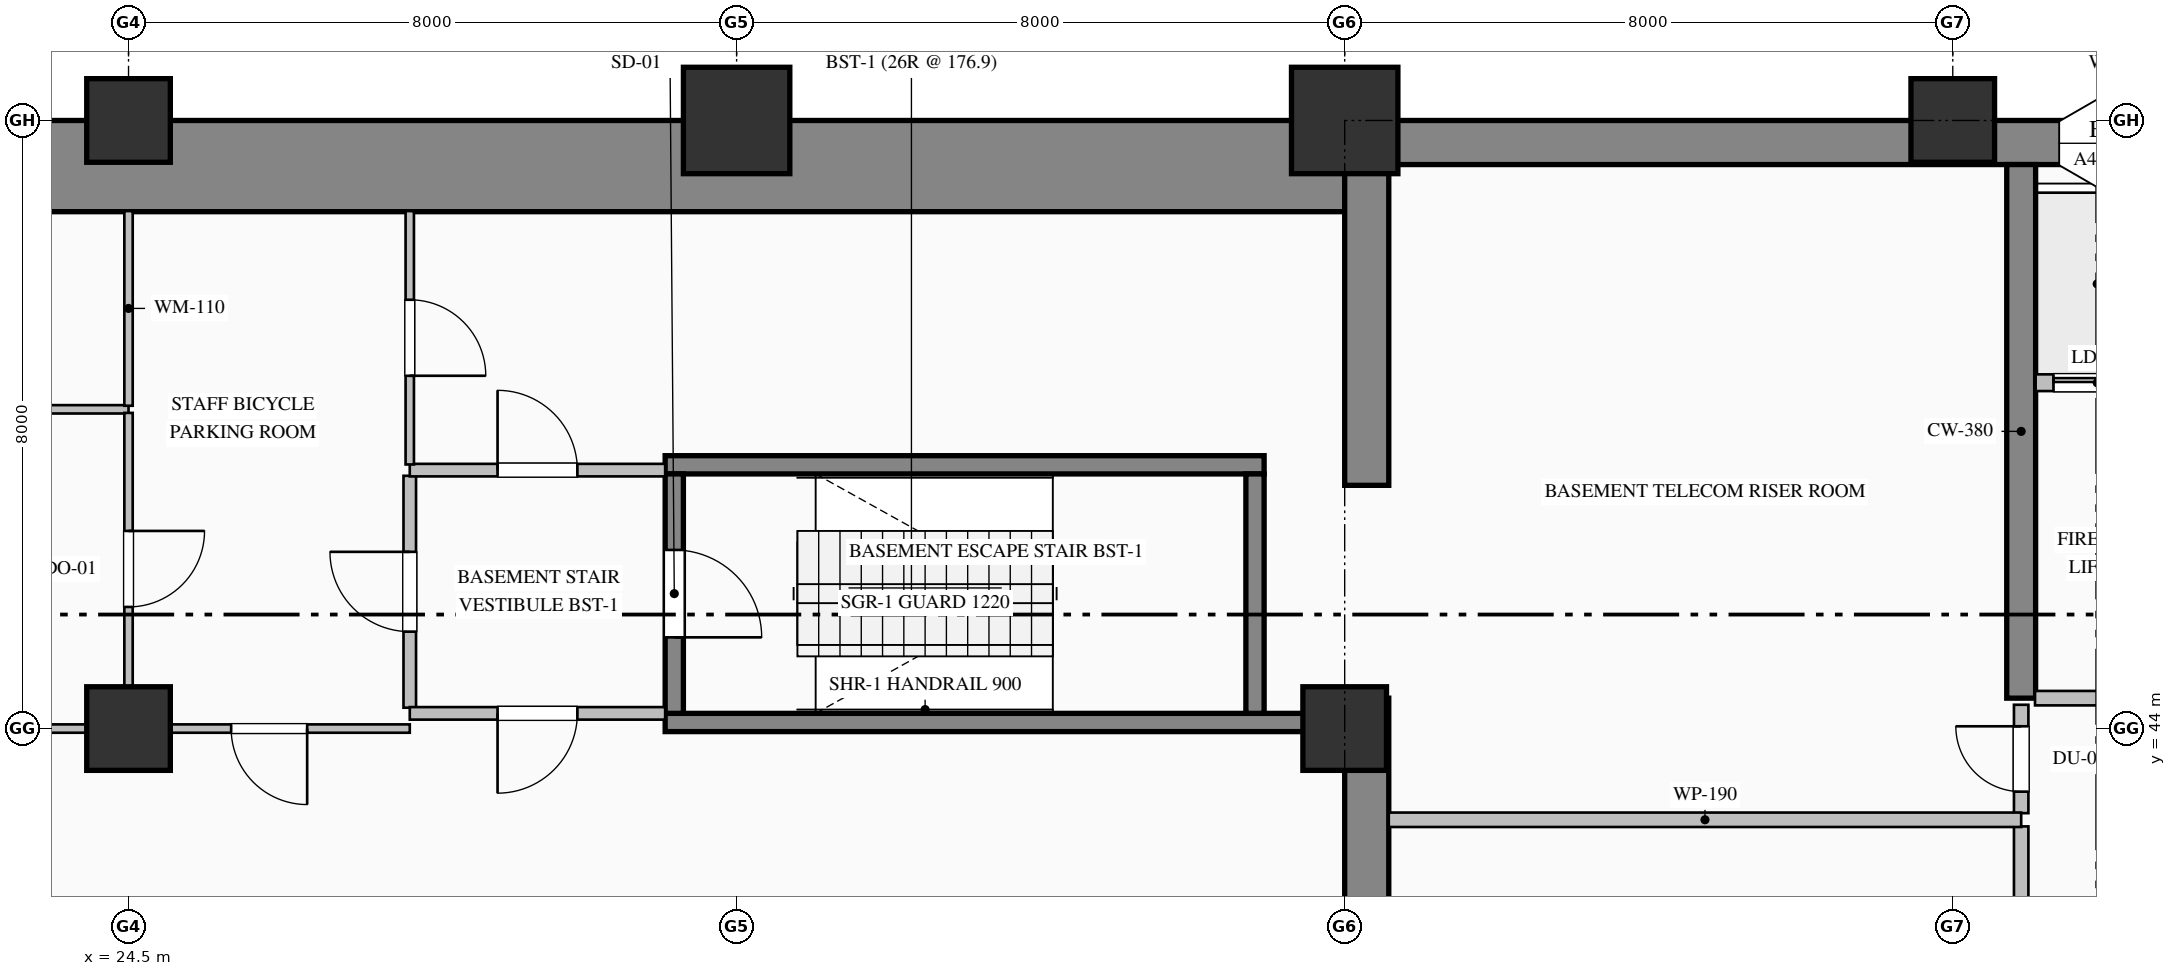
"""IFC4 building model, lengths in metres.
Left out: names, types, materials, properties, quantities, classifications, styles, units other than length and angle.
Written with IfcOpenShell. Run it as: python <this file> out.ifc"""

import sys

from ifc_helpers import new_model, si_unit, direction, frame, frame_2d, origin, origin_2d, place, context, subcontext, project, spatial, rectangle, hollow_rectangle, extrude, element, fill, save


model = new_model("IFC4")
c1 = context("Model", 3, precision=1e-05, world=origin(), true_north=direction((0.0, 1.0)))
c2 = subcontext(c1, "Body", "Model", "MODEL_VIEW")
j1 = project(units=[si_unit("LENGTHUNIT", "METRE"), si_unit("PLANEANGLEUNIT", "RADIAN")], contexts=[c1])
p1 = place(None, origin())
s1 = spatial("IfcSite", under=j1, at=p1, CompositionType="ELEMENT")
p2 = place(p1, origin())
s2 = spatial("IfcBuilding", under=s1, at=p2, CompositionType="ELEMENT")
p3 = place(p2, frame((0.0, 0.0, -4.6)))
s3 = spatial("IfcBuildingStorey", under=s2, at=p3, CompositionType="ELEMENT", Elevation=-4.6)
p4 = place(p3, frame((-1.2, 51.4, 0.0), z_axis=(0.0, 0.0, 1.0), x_axis=(1.0, 0.0, 0.0)))
e1 = element("IfcWall", 1, at=p4, inside=s3, PredefinedType="USERDEFINED", context=c2, shape_type="SweptSolid", body=[
    extrude(rectangle(XDim=41.7, YDim=1.2, at=frame_2d((20.85, 0.0))), origin(), (0.0, 0.0, 1.0), 4.45),
])
p5 = place(p3, frame((40.5, 51.71, 0.0), z_axis=(0.0, 0.0, 1.0), x_axis=(1.0, 0.0, 0.0)))
e2 = element("IfcWall", 2, at=p5, inside=s3, PredefinedType="SHEAR", context=c2, shape_type="SweptSolid", body=[
    extrude(rectangle(XDim=23.5, YDim=0.58, at=frame_2d((11.75, 0.0))), origin(), (0.0, 0.0, 1.0), 4.18),
])
p6 = place(p3, frame((40.79, 36.58, 0.0), z_axis=(0.0, 0.0, 1.0), x_axis=(0.0, 1.0, 0.0)))
e3 = element("IfcWall", 3, at=p6, inside=s3, PredefinedType="SHEAR", context=c2, shape_type="SweptSolid", body=[
    extrude(rectangle(XDim=7.82, YDim=0.58, at=frame_2d((3.91, 0.0))), origin(), (0.0, 0.0, 1.0), 4.18),
])
p7 = place(p3, frame((40.79, 47.2, 0.0), z_axis=(0.0, 0.0, 1.0), x_axis=(0.0, 1.0, 0.0)))
e4 = element("IfcWall", 4, at=p7, inside=s3, PredefinedType="SHEAR", context=c2, shape_type="SweptSolid", body=[
    extrude(rectangle(XDim=4.22, YDim=0.58, at=frame_2d((2.11, 0.0))), origin(), (0.0, 0.0, 1.0), 4.18),
])
p8 = place(p3, frame((49.4, 44.4, 0.0), z_axis=(0.0, 0.0, 1.0), x_axis=(0.0, 1.0, 0.0)))
e5 = element("IfcWall", 5, at=p8, inside=s3, PredefinedType="SHEAR", context=c2, shape_type="SweptSolid", body=[
    extrude(rectangle(XDim=7.02, YDim=0.38, at=frame_2d((3.51, 0.0))), origin(), (0.0, 0.0, 1.0), 4.18),
])
p9 = place(p3, frame((24.5, 44.0, 0.0), z_axis=(0.0, 0.0, 1.0), x_axis=(1.0, 0.0, 0.0)))
e6 = element("IfcColumn", 6, at=p9, inside=s3, PredefinedType="COLUMN", context=c2, shape_type="SweptSolid", body=[
    extrude(rectangle(XDim=1.1, YDim=1.1, at=origin_2d()), origin(), (0.0, 0.0, 1.0), 4.6),
])
p10 = place(p3, frame((24.5, 52.0, 0.0), z_axis=(0.0, 0.0, 1.0), x_axis=(1.0, 0.0, 0.0)))
e7 = element("IfcColumn", 7, at=p10, inside=s3, PredefinedType="COLUMN", context=c2, shape_type="SweptSolid", body=[
    extrude(hollow_rectangle(XDim=1.1, YDim=1.1, WallThickness=0.04, at=origin_2d()), origin(), (0.0, 0.0, 1.0), 4.6),
])
p11 = place(p3, frame((32.5, 52.0, 0.0), z_axis=(0.0, 0.0, 1.0), x_axis=(1.0, 0.0, 0.0)))
e8 = element("IfcColumn", 8, at=p11, inside=s3, PredefinedType="COLUMN", context=c2, shape_type="SweptSolid", body=[
    extrude(hollow_rectangle(XDim=1.4, YDim=1.4, WallThickness=0.05, at=origin_2d()), origin(), (0.0, 0.0, 1.0), 4.6),
])
p12 = place(p3, frame((40.5, 44.0, 0.0), z_axis=(0.0, 0.0, 1.0), x_axis=(1.0, 0.0, 0.0)))
e9 = element("IfcColumn", 9, at=p12, inside=s3, PredefinedType="COLUMN", context=c2, shape_type="SweptSolid", body=[
    extrude(rectangle(XDim=1.1, YDim=1.1, at=origin_2d()), origin(), (0.0, 0.0, 1.0), 4.6),
])
p13 = place(p3, frame((40.5, 52.0, 0.0), z_axis=(0.0, 0.0, 1.0), x_axis=(1.0, 0.0, 0.0)))
e10 = element("IfcColumn", 10, at=p13, inside=s3, PredefinedType="COLUMN", context=c2, shape_type="SweptSolid", body=[
    extrude(hollow_rectangle(XDim=1.4, YDim=1.4, WallThickness=0.05, at=origin_2d()), origin(), (0.0, 0.0, 1.0), 4.6),
])
p14 = place(p3, frame((48.5, 52.0, 0.0), z_axis=(0.0, 0.0, 1.0), x_axis=(1.0, 0.0, 0.0)))
e11 = element("IfcColumn", 11, at=p14, inside=s3, PredefinedType="COLUMN", context=c2, shape_type="SweptSolid", body=[
    extrude(hollow_rectangle(XDim=1.1, YDim=1.1, WallThickness=0.04, at=origin_2d()), origin(), (0.0, 0.0, 1.0), 4.6),
])
p15 = place(p3, frame((31.56, 47.47, 0.0), z_axis=(0.0, 0.0, 1.0), x_axis=(1.0, 0.0, 0.0)))
e12 = element("IfcWall", 12, at=p15, inside=s3, PredefinedType="SOLIDWALL", context=c2, shape_type="SweptSolid", body=[
    extrude(rectangle(XDim=7.88, YDim=0.24, at=frame_2d((3.94, 0.0))), origin(), (0.0, 0.0, 1.0), 4.6),
])
p16 = place(p3, frame((39.97, 44.08, 0.0), z_axis=(0.0, 0.0, 1.0), x_axis=(-1.0, 0.0, 0.0)))
e13 = element("IfcWall", 13, at=p16, inside=s3, PredefinedType="SOLIDWALL", context=c2, shape_type="SweptSolid", body=[
    extrude(rectangle(XDim=8.41, YDim=0.24, at=frame_2d((4.205, 0.0))), origin(), (0.0, 0.0, 1.0), 4.6),
])
p17 = place(p3, frame((31.68, 47.35, 0.0), z_axis=(0.0, 0.0, 1.0), x_axis=(0.0, -1.0, 0.0)))
e14 = element("IfcWall", 14, at=p17, inside=s3, PredefinedType="SOLIDWALL", context=c2, shape_type="SweptSolid", body=[
    extrude(rectangle(XDim=3.15, YDim=0.24, at=frame_2d((1.575, 0.0))), origin(), (0.0, 0.0, 1.0), 4.6),
])
p18 = place(p17, frame((1.0, 0.0, 0.0)))
e15 = element("IfcOpeningElement", 15, at=p18, cuts=e14, PredefinedType="OPENING", context=c2, shape_type="SweptSolid", body=[
    extrude(rectangle(XDim=1.15, YDim=2.2, at=frame_2d((0.575, 1.1))), frame((0.0, 0.13, 0.0), z_axis=(0.0, -1.0, 0.0), x_axis=(1.0, 0.0, 0.0)), (0.0, 0.0, 1.0), 0.26),
])
p19 = place(p3, frame((39.32, 44.2, 0.0), z_axis=(0.0, 0.0, 1.0), x_axis=(0.0, 1.0, 0.0)))
e16 = element("IfcWall", 16, at=p19, inside=s3, PredefinedType="SOLIDWALL", context=c2, shape_type="SweptSolid", body=[
    extrude(rectangle(XDim=3.15, YDim=0.24, at=frame_2d((1.575, 0.0))), origin(), (0.0, 0.0, 1.0), 4.6),
])
p20 = place(p3, frame((54.71, 48.55, 0.0), z_axis=(0.0, 0.0, 1.0), x_axis=(-1.0, 0.0, 0.0)))
e17 = element("IfcWall", 17, at=p20, inside=s3, PredefinedType="PARTITIONING", context=c2, shape_type="SweptSolid", body=[
    extrude(rectangle(XDim=5.12, YDim=0.22, at=frame_2d((2.56, 0.0))), origin(), (0.0, 0.0, 1.0), 4.18),
])
p21 = place(p20, frame((3.735, 0.0, 0.0)))
e18 = element("IfcOpeningElement", 18, at=p21, cuts=e17, PredefinedType="OPENING", context=c2, shape_type="SweptSolid", body=[
    extrude(rectangle(XDim=1.15, YDim=2.2, at=frame_2d((0.575, 1.1))), frame((0.0, 0.12, 0.0), z_axis=(0.0, -1.0, 0.0), x_axis=(1.0, 0.0, 0.0)), (0.0, 0.0, 1.0), 0.24),
])
p22 = place(p20, frame((0.935, 0.0, 0.0)))
e19 = element("IfcOpeningElement", 19, at=p22, cuts=e17, PredefinedType="OPENING", context=c2, shape_type="SweptSolid", body=[
    extrude(rectangle(XDim=1.15, YDim=2.2, at=frame_2d((0.575, 1.1))), frame((0.0, 0.12, 0.0), z_axis=(0.0, -1.0, 0.0), x_axis=(1.0, 0.0, 0.0)), (0.0, 0.0, 1.0), 0.24),
])
p23 = place(p3, frame((54.718, 44.4, 0.0), z_axis=(0.0, 0.0, 1.0), x_axis=(-1.0, 0.0, 0.0)))
e20 = element("IfcWall", 20, at=p23, inside=s3, PredefinedType="PARTITIONING", context=c2, shape_type="SweptSolid", body=[
    extrude(rectangle(XDim=5.136, YDim=0.19, at=frame_2d((2.568, 0.0))), origin(), (0.0, 0.0, 1.0), 4.18),
])
p24 = place(p23, frame((2.043, 0.0, 0.0)))
e21 = element("IfcOpeningElement", 21, at=p24, cuts=e20, PredefinedType="OPENING", context=c2, shape_type="SweptSolid", body=[
    extrude(rectangle(XDim=1.05, YDim=2.15, at=frame_2d((0.525, 1.075))), frame((0.0, 0.105, 0.0), z_axis=(0.0, -1.0, 0.0), x_axis=(1.0, 0.0, 0.0)), (0.0, 0.0, 1.0), 0.21),
])
p25 = place(p3, frame((49.4, 36.58, 0.0), z_axis=(0.0, 0.0, 1.0), x_axis=(0.0, 1.0, 0.0)))
e22 = element("IfcWall", 22, at=p25, inside=s3, PredefinedType="PARTITIONING", context=c2, shape_type="SweptSolid", body=[
    extrude(rectangle(XDim=6.133, YDim=0.19, at=frame_2d((3.066, 0.0))), origin(), (0.0, 0.0, 1.0), 3.272),
])
p26 = place(p25, frame((2.366, 0.0, 0.0)))
e23 = element("IfcOpeningElement", 23, at=p26, cuts=e22, PredefinedType="OPENING", context=c2, shape_type="SweptSolid", body=[
    extrude(rectangle(XDim=1.4, YDim=2.25, at=frame_2d((0.7, 1.125))), frame((0.0, 0.105, 0.0), z_axis=(0.0, -1.0, 0.0), x_axis=(1.0, 0.0, 0.0)), (0.0, 0.0, 1.0), 0.21),
])
p27 = place(p3, frame((49.4, 42.887, 0.0), z_axis=(0.0, 0.0, 1.0), x_axis=(0.0, 1.0, 0.0)))
e24 = element("IfcWall", 24, at=p27, inside=s3, PredefinedType="PARTITIONING", context=c2, shape_type="SweptSolid", body=[
    extrude(rectangle(XDim=1.426, YDim=0.19, at=frame_2d((0.713, 0.0))), origin(), (0.0, 0.0, 1.0), 3.272),
])
p28 = place(p27, frame((0.283, 0.0, 0.0)))
e25 = element("IfcOpeningElement", 25, at=p28, cuts=e24, PredefinedType="OPENING", context=c2, shape_type="SweptSolid", body=[
    extrude(rectangle(XDim=0.86, YDim=2.1, at=frame_2d((0.43, 1.05))), frame((0.0, 0.105, 0.0), z_axis=(0.0, -1.0, 0.0), x_axis=(1.0, 0.0, 0.0)), (0.0, 0.0, 1.0), 0.21),
])
p29 = place(p3, frame((41.08, 42.8, 0.0), z_axis=(0.0, 0.0, 1.0), x_axis=(1.0, 0.0, 0.0)))
e26 = element("IfcWall", 26, at=p29, inside=s3, PredefinedType="PARTITIONING", context=c2, shape_type="SweptSolid", body=[
    extrude(rectangle(XDim=8.32, YDim=0.19, at=frame_2d((4.16, 0.0))), origin(), (0.0, 0.0, 1.0), 4.18),
])
p30 = place(p3, frame((28.2, 44.274, 0.0), z_axis=(0.0, 0.0, 1.0), x_axis=(0.0, 1.0, 0.0)))
e27 = element("IfcWall", 27, at=p30, inside=s3, PredefinedType="PARTITIONING", context=c2, shape_type="SweptSolid", body=[
    extrude(rectangle(XDim=3.051, YDim=0.165, at=frame_2d((1.525, 0.0))), origin(), (0.0, 0.0, 1.0), 4.18),
])
p31 = place(p30, frame((1.0, 0.0, 0.0)))
e28 = element("IfcOpeningElement", 28, at=p31, cuts=e27, PredefinedType="OPENING", context=c2, shape_type="SweptSolid", body=[
    extrude(rectangle(XDim=1.05, YDim=2.15, at=frame_2d((0.525, 1.075))), frame((0.0, 0.093, 0.0), z_axis=(0.0, -1.0, 0.0), x_axis=(1.0, 0.0, 0.0)), (0.0, 0.0, 1.0), 0.185),
])
p32 = place(p3, frame((31.56, 44.2, 0.0), z_axis=(0.0, 0.0, 1.0), x_axis=(-1.0, 0.0, 0.0)))
e29 = element("IfcWall", 29, at=p32, inside=s3, PredefinedType="PARTITIONING", context=c2, shape_type="SweptSolid", body=[
    extrude(rectangle(XDim=3.36, YDim=0.165, at=frame_2d((1.68, 0.0))), origin(), (0.0, 0.0, 1.0), 4.18),
])
p33 = place(p32, frame((1.155, 0.0, 0.0)))
e30 = element("IfcOpeningElement", 30, at=p33, cuts=e29, PredefinedType="OPENING", context=c2, shape_type="SweptSolid", body=[
    extrude(rectangle(XDim=1.05, YDim=2.15, at=frame_2d((0.525, 1.075))), frame((0.0, 0.093, 0.0), z_axis=(0.0, -1.0, 0.0), x_axis=(1.0, 0.0, 0.0)), (0.0, 0.0, 1.0), 0.185),
])
p34 = place(p3, frame((28.2, 47.4, 0.0), z_axis=(0.0, 0.0, 1.0), x_axis=(1.0, 0.0, 0.0)))
e31 = element("IfcWall", 31, at=p34, inside=s3, PredefinedType="PARTITIONING", context=c2, shape_type="SweptSolid", body=[
    extrude(rectangle(XDim=3.36, YDim=0.165, at=frame_2d((1.68, 0.0))), origin(), (0.0, 0.0, 1.0), 4.18),
])
p35 = place(p34, frame((1.155, 0.0, 0.0)))
e32 = element("IfcOpeningElement", 32, at=p35, cuts=e31, PredefinedType="OPENING", context=c2, shape_type="SweptSolid", body=[
    extrude(rectangle(XDim=1.05, YDim=2.15, at=frame_2d((0.525, 1.075))), frame((0.0, 0.093, 0.0), z_axis=(0.0, -1.0, 0.0), x_axis=(1.0, 0.0, 0.0)), (0.0, 0.0, 1.0), 0.185),
])
p36 = place(p3, frame((7.0, 48.2, 0.0), z_axis=(0.0, 0.0, 1.0), x_axis=(1.0, 0.0, 0.0)))
e33 = element("IfcWall", 33, at=p36, inside=s3, PredefinedType="MOVABLE", context=c2, shape_type="SweptSolid", body=[
    extrude(rectangle(XDim=17.5, YDim=0.11, at=frame_2d((8.75, 0.0))), origin(), (0.0, 0.0, 1.0), 4.18),
])
p37 = place(p36, frame((8.3, 0.0, 0.0)))
e34 = element("IfcOpeningElement", 34, at=p37, cuts=e33, PredefinedType="OPENING", context=c2, shape_type="SweptSolid", body=[
    extrude(rectangle(XDim=0.9, YDim=2.15, at=frame_2d((0.45, 1.075))), frame((0.0, 0.065, 0.0), z_axis=(0.0, -1.0, 0.0), x_axis=(1.0, 0.0, 0.0)), (0.0, 0.0, 1.0), 0.13),
])
p38 = place(p3, frame((24.5, 48.153, 0.0), z_axis=(0.0, 0.0, 1.0), x_axis=(0.0, -1.0, 0.0)))
e35 = element("IfcWall", 35, at=p38, inside=s3, PredefinedType="MOVABLE", context=c2, shape_type="SweptSolid", body=[
    extrude(rectangle(XDim=4.106, YDim=0.11, at=frame_2d((2.053, 0.0))), origin(), (0.0, 0.0, 1.0), 3.272),
])
p39 = place(p38, frame((1.553, 0.0, 0.0)))
e36 = element("IfcOpeningElement", 36, at=p39, cuts=e35, PredefinedType="OPENING", context=c2, shape_type="SweptSolid", body=[
    extrude(rectangle(XDim=1.0, YDim=2.15, at=frame_2d((0.5, 1.075))), frame((0.0, 0.065, 0.0), z_axis=(0.0, -1.0, 0.0), x_axis=(1.0, 0.0, 0.0)), (0.0, 0.0, 1.0), 0.13),
])
p40 = place(p3, frame((24.5, 44.0, 0.0), z_axis=(0.0, 0.0, 1.0), x_axis=(-1.0, 0.0, 0.0)))
e37 = element("IfcWall", 37, at=p40, inside=s3, PredefinedType="MOVABLE", context=c2, shape_type="SweptSolid", body=[
    extrude(rectangle(XDim=17.5, YDim=0.11, at=frame_2d((8.75, 0.0))), origin(), (0.0, 0.0, 1.0), 3.272),
])
p41 = place(p40, frame((8.7, 0.0, 0.0)))
e38 = element("IfcOpeningElement", 38, at=p41, cuts=e37, PredefinedType="OPENING", context=c2, shape_type="SweptSolid", body=[
    extrude(rectangle(XDim=1.0, YDim=2.15, at=frame_2d((0.5, 1.075))), frame((0.0, 0.065, 0.0), z_axis=(0.0, -1.0, 0.0), x_axis=(1.0, 0.0, 0.0)), (0.0, 0.0, 1.0), 0.13),
])
p42 = place(p3, frame((24.5, 50.808, 0.0), z_axis=(0.0, 0.0, 1.0), x_axis=(0.0, -1.0, 0.0)))
e39 = element("IfcWall", 39, at=p42, inside=s3, PredefinedType="MOVABLE", context=c2, shape_type="SweptSolid", body=[
    extrude(rectangle(XDim=2.561, YDim=0.11, at=frame_2d((1.281, 0.0))), origin(), (0.0, 0.0, 1.0), 3.272),
])
p43 = place(p3, frame((28.2, 44.0, 0.0), z_axis=(0.0, 0.0, 1.0), x_axis=(-1.0, 0.0, 0.0)))
e40 = element("IfcWall", 40, at=p43, inside=s3, PredefinedType="MOVABLE", context=c2, shape_type="SweptSolid", body=[
    extrude(rectangle(XDim=3.7, YDim=0.11, at=frame_2d((1.85, 0.0))), origin(), (0.0, 0.0, 1.0), 4.18),
])
p44 = place(p43, frame((1.35, 0.0, 0.0)))
e41 = element("IfcOpeningElement", 41, at=p44, cuts=e40, PredefinedType="OPENING", context=c2, shape_type="SweptSolid", body=[
    extrude(rectangle(XDim=1.0, YDim=2.15, at=frame_2d((0.5, 1.075))), frame((0.0, 0.065, 0.0), z_axis=(0.0, -1.0, 0.0), x_axis=(1.0, 0.0, 0.0)), (0.0, 0.0, 1.0), 0.13),
])
p45 = place(p3, frame((28.2, 50.808, 0.0), z_axis=(0.0, 0.0, 1.0), x_axis=(0.0, -1.0, 0.0)))
e42 = element("IfcWall", 42, at=p45, inside=s3, PredefinedType="MOVABLE", context=c2, shape_type="SweptSolid", body=[
    extrude(rectangle(XDim=3.333, YDim=0.11, at=frame_2d((1.667, 0.0))), origin(), (0.0, 0.0, 1.0), 4.18),
])
p46 = place(p45, frame((1.167, 0.0, 0.0)))
e43 = element("IfcOpeningElement", 43, at=p46, cuts=e42, PredefinedType="OPENING", context=c2, shape_type="SweptSolid", body=[
    extrude(rectangle(XDim=1.0, YDim=2.15, at=frame_2d((0.5, 1.075))), frame((0.0, 0.065, 0.0), z_axis=(0.0, -1.0, 0.0), x_axis=(1.0, 0.0, 0.0)), (0.0, 0.0, 1.0), 0.13),
])
p47 = place(p18, origin())
e44 = element("IfcDoor", 44, at=p47, inside=s3, OperationType="SINGLE_SWING_RIGHT", PredefinedType="DOOR", context=c2, shape_type="SweptSolid", body=[
    extrude(rectangle(XDim=1.15, YDim=2.2, at=frame_2d((0.575, 1.1))), frame((0.0, 0.025, 0.0), z_axis=(0.0, -1.0, 0.0), x_axis=(1.0, 0.0, 0.0)), (0.0, 0.0, 1.0), 0.05),
])
fill(e15, e44)
p48 = place(p21, origin())
e45 = element("IfcDoor", 45, at=p48, inside=s3, OperationType="DOUBLE_DOOR_SLIDING", PredefinedType="DOOR", context=c2, shape_type="SweptSolid", body=[
    extrude(rectangle(XDim=1.15, YDim=2.2, at=frame_2d((0.575, 1.1))), frame((0.0, 0.025, 0.0), z_axis=(0.0, -1.0, 0.0), x_axis=(1.0, 0.0, 0.0)), (0.0, 0.0, 1.0), 0.05),
])
fill(e18, e45)
p49 = place(p39, origin())
e46 = element("IfcDoor", 46, at=p49, inside=s3, OperationType="SINGLE_SWING_LEFT", PredefinedType="DOOR", context=c2, shape_type="SweptSolid", body=[
    extrude(rectangle(XDim=1.0, YDim=2.15, at=frame_2d((0.5, 1.075))), frame((0.0, 0.025, 0.0), z_axis=(0.0, -1.0, 0.0), x_axis=(1.0, 0.0, 0.0)), (0.0, 0.0, 1.0), 0.05),
])
fill(e36, e46)
p50 = place(p44, origin())
e47 = element("IfcDoor", 47, at=p50, inside=s3, OperationType="SINGLE_SWING_LEFT", PredefinedType="DOOR", context=c2, shape_type="SweptSolid", body=[
    extrude(rectangle(XDim=1.0, YDim=2.15, at=frame_2d((0.5, 1.075))), frame((0.0, 0.025, 0.0), z_axis=(0.0, -1.0, 0.0), x_axis=(1.0, 0.0, 0.0)), (0.0, 0.0, 1.0), 0.05),
])
fill(e41, e47)
p51 = place(p33, origin())
e48 = element("IfcDoor", 48, at=p51, inside=s3, OperationType="SINGLE_SWING_RIGHT", PredefinedType="DOOR", context=c2, shape_type="SweptSolid", body=[
    extrude(rectangle(XDim=1.05, YDim=2.15, at=frame_2d((0.525, 1.075))), frame((0.0, 0.025, 0.0), z_axis=(0.0, -1.0, 0.0), x_axis=(1.0, 0.0, 0.0)), (0.0, 0.0, 1.0), 0.05),
])
fill(e30, e48)
p52 = place(p35, origin())
e49 = element("IfcDoor", 49, at=p52, inside=s3, OperationType="SINGLE_SWING_LEFT", PredefinedType="DOOR", context=c2, shape_type="SweptSolid", body=[
    extrude(rectangle(XDim=1.05, YDim=2.15, at=frame_2d((0.525, 1.075))), frame((0.0, 0.025, 0.0), z_axis=(0.0, -1.0, 0.0), x_axis=(1.0, 0.0, 0.0)), (0.0, 0.0, 1.0), 0.05),
])
fill(e32, e49)
p53 = place(p46, origin())
e50 = element("IfcDoor", 50, at=p53, inside=s3, OperationType="SINGLE_SWING_RIGHT", PredefinedType="DOOR", context=c2, shape_type="SweptSolid", body=[
    extrude(rectangle(XDim=1.0, YDim=2.15, at=frame_2d((0.5, 1.075))), frame((0.0, 0.025, 0.0), z_axis=(0.0, -1.0, 0.0), x_axis=(1.0, 0.0, 0.0)), (0.0, 0.0, 1.0), 0.05),
])
fill(e43, e50)
p54 = place(p31, origin())
e51 = element("IfcDoor", 51, at=p54, inside=s3, OperationType="SINGLE_SWING_RIGHT", PredefinedType="DOOR", context=c2, shape_type="SweptSolid", body=[
    extrude(rectangle(XDim=1.05, YDim=2.15, at=frame_2d((0.525, 1.075))), frame((0.0, 0.025, 0.0), z_axis=(0.0, -1.0, 0.0), x_axis=(1.0, 0.0, 0.0)), (0.0, 0.0, 1.0), 0.05),
])
fill(e28, e51)
p55 = place(p28, origin())
e52 = element("IfcDoor", 52, at=p55, inside=s3, OperationType="SINGLE_SWING_RIGHT", PredefinedType="DOOR", context=c2, shape_type="SweptSolid", body=[
    extrude(rectangle(XDim=0.86, YDim=2.1, at=frame_2d((0.43, 1.05))), frame((0.0, 0.025, 0.0), z_axis=(0.0, -1.0, 0.0), x_axis=(1.0, 0.0, 0.0)), (0.0, 0.0, 1.0), 0.05),
])
fill(e25, e52)
save(model, sys.argv[1])
